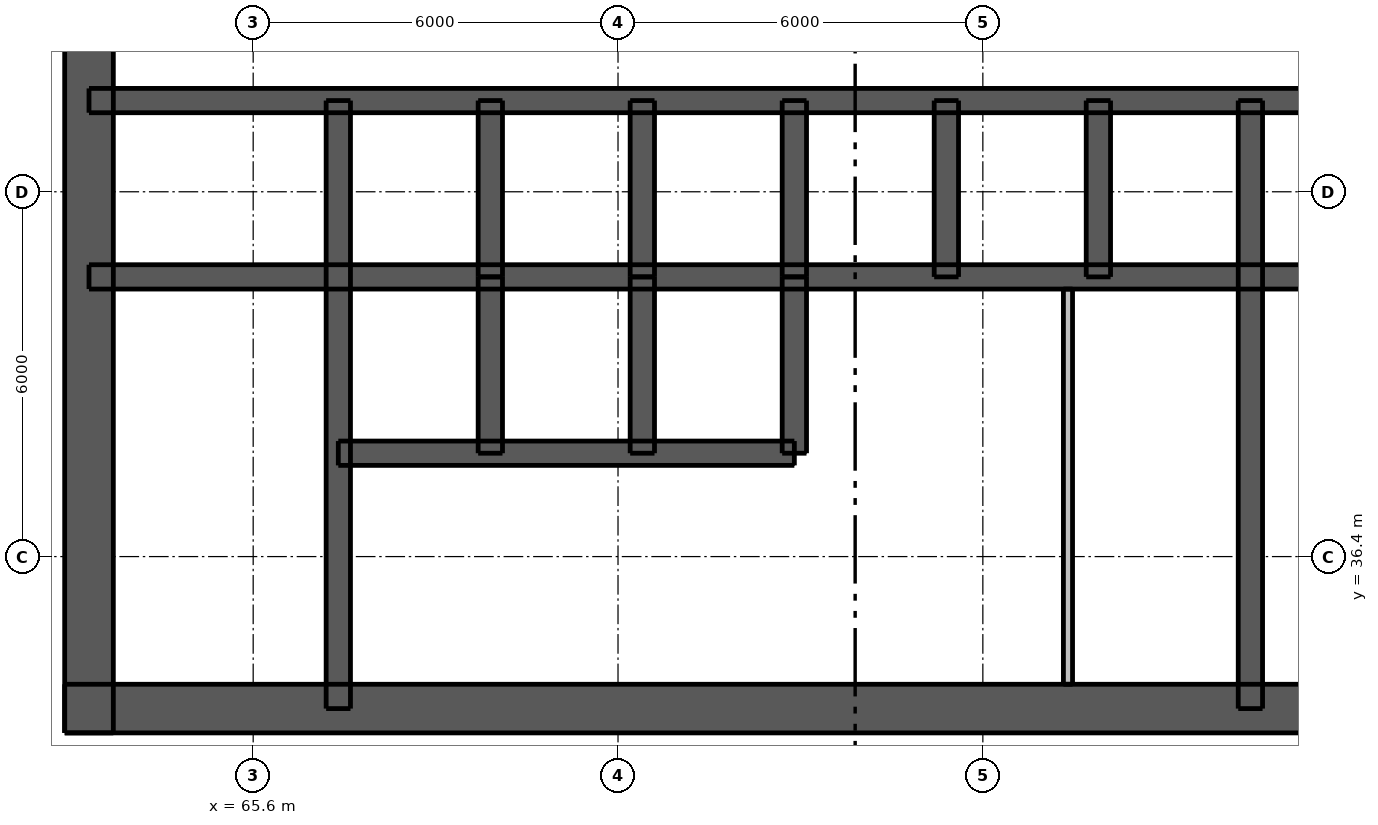
"""IFC4 building model, lengths in metres.
Left out: names, types, materials, properties, quantities, classifications, styles, units other than length and angle.
Written with IfcOpenShell. Run it as: python <this file> out.ifc"""

import sys

from ifc_helpers import new_model, si_unit, direction, frame, frame_2d, origin, place, context, subcontext, project, spatial, rectangle, extrude, element, fill, save


model = new_model("IFC4")
c1 = context("Model", 3, precision=1e-05, world=origin(), true_north=direction((0.0, 1.0)))
c2 = subcontext(c1, "Body", "Model", "MODEL_VIEW")
j1 = project(units=[si_unit("LENGTHUNIT", "METRE"), si_unit("PLANEANGLEUNIT", "RADIAN")], contexts=[c1])
p1 = place(None, origin())
s1 = spatial("IfcSite", under=j1, at=p1, CompositionType="ELEMENT")
p2 = place(p1, origin())
s2 = spatial("IfcBuilding", under=s1, at=p2, CompositionType="ELEMENT")
p3 = place(p2, frame((0.0, 0.0, 118.3)))
s3 = spatial("IfcBuildingStorey", under=s2, at=p3, CompositionType="ELEMENT", Elevation=118.3)
p4 = place(p3, frame((62.5, 33.9, 0.0), z_axis=(0.0, 0.0, 1.0), x_axis=(1.0, 0.0, 0.0)))
e1 = element("IfcWall", 1, at=p4, inside=s3, PredefinedType="SHEAR", context=c2, shape_type="SweptSolid", body=[
    extrude(rectangle(XDim=24.0, YDim=0.8, at=frame_2d((12.0, 0.0))), origin(), (0.0, 0.0, 1.0), 3.05),
])
p5 = place(p4, frame((2.0, 0.0, 0.0)))
e2 = element("IfcOpeningElement", 2, at=p5, cuts=e1, PredefinedType="OPENING", context=c2, shape_type="SweptSolid", body=[
    extrude(rectangle(XDim=1.1, YDim=2.1, at=frame_2d((0.55, 1.05))), frame((0.0, 0.41, 0.0), z_axis=(0.0, -1.0, 0.0), x_axis=(1.0, 0.0, 0.0)), (0.0, 0.0, 1.0), 0.82),
])
p6 = place(p4, frame((20.9, 0.0, 0.0)))
e3 = element("IfcOpeningElement", 3, at=p6, cuts=e1, PredefinedType="OPENING", context=c2, shape_type="SweptSolid", body=[
    extrude(rectangle(XDim=1.1, YDim=2.1, at=frame_2d((0.55, 1.05))), frame((0.0, 0.41, 0.0), z_axis=(0.0, -1.0, 0.0), x_axis=(1.0, 0.0, 0.0)), (0.0, 0.0, 1.0), 0.82),
])
p7 = place(p4, frame((8.0, 0.0, 0.0)))
e4 = element("IfcOpeningElement", 4, at=p7, cuts=e1, PredefinedType="OPENING", context=c2, shape_type="SweptSolid", body=[
    extrude(rectangle(XDim=1.1, YDim=2.1, at=frame_2d((0.55, 1.05))), frame((0.0, 0.41, 0.0), z_axis=(0.0, -1.0, 0.0), x_axis=(1.0, 0.0, 0.0)), (0.0, 0.0, 1.0), 0.82),
])
p8 = place(p4, frame((17.488, 0.0, 0.0)))
e5 = element("IfcOpeningElement", 5, at=p8, cuts=e1, PredefinedType="OPENING", context=c2, shape_type="SweptSolid", body=[
    extrude(rectangle(XDim=0.9, YDim=2.1, at=frame_2d((0.45, 1.05))), frame((0.0, 0.41, 0.0), z_axis=(0.0, -1.0, 0.0), x_axis=(1.0, 0.0, 0.0)), (0.0, 0.0, 1.0), 0.82),
])
p9 = place(p3, frame((62.9, 33.5, 0.0), z_axis=(0.0, 0.0, 1.0), x_axis=(0.0, 1.0, 0.0)))
e6 = element("IfcWall", 6, at=p9, inside=s3, PredefinedType="SHEAR", context=c2, shape_type="SweptSolid", body=[
    extrude(rectangle(XDim=24.0, YDim=0.8, at=frame_2d((12.0, 0.0))), origin(), (0.0, 0.0, 1.0), 3.05),
])
p10 = place(p9, frame((11.2, 0.0, 0.0)))
e7 = element("IfcOpeningElement", 7, at=p10, cuts=e6, PredefinedType="OPENING", context=c2, shape_type="SweptSolid", body=[
    extrude(rectangle(XDim=1.6, YDim=2.1, at=frame_2d((0.8, 1.05))), frame((0.0, 0.41, 0.0), z_axis=(0.0, -1.0, 0.0), x_axis=(1.0, 0.0, 0.0)), (0.0, 0.0, 1.0), 0.82),
])
p11 = place(p3, frame((62.9, 41.0, 0.0), z_axis=(0.0, 0.0, 1.0), x_axis=(1.0, 0.0, 0.0)))
e8 = element("IfcWall", 8, at=p11, inside=s3, PredefinedType="SHEAR", context=c2, shape_type="SweptSolid", body=[
    extrude(rectangle(XDim=23.2, YDim=0.4, at=frame_2d((11.6, 0.0))), origin(), (0.0, 0.0, 1.0), 3.05),
])
p12 = place(p3, frame((62.9, 43.9, 0.0), z_axis=(0.0, 0.0, 1.0), x_axis=(1.0, 0.0, 0.0)))
e9 = element("IfcWall", 9, at=p12, inside=s3, PredefinedType="SHEAR", context=c2, shape_type="SweptSolid", body=[
    extrude(rectangle(XDim=23.2, YDim=0.4, at=frame_2d((11.6, 0.0))), origin(), (0.0, 0.0, 1.0), 3.05),
])
p13 = place(p12, frame((1.7, 0.0, 0.0)))
e10 = element("IfcOpeningElement", 10, at=p13, cuts=e9, PredefinedType="OPENING", context=c2, shape_type="SweptSolid", body=[
    extrude(rectangle(XDim=0.9, YDim=2.1, at=frame_2d((0.45, 1.05))), frame((0.0, 0.21, 0.0), z_axis=(0.0, -1.0, 0.0), x_axis=(1.0, 0.0, 0.0)), (0.0, 0.0, 1.0), 0.42),
])
p14 = place(p12, frame((20.6, 0.0, 0.0)))
e11 = element("IfcOpeningElement", 11, at=p14, cuts=e9, PredefinedType="OPENING", context=c2, shape_type="SweptSolid", body=[
    extrude(rectangle(XDim=0.9, YDim=2.1, at=frame_2d((0.45, 1.05))), frame((0.0, 0.21, 0.0), z_axis=(0.0, -1.0, 0.0), x_axis=(1.0, 0.0, 0.0)), (0.0, 0.0, 1.0), 0.42),
])
p15 = place(p12, frame((4.8, 0.0, 0.0)))
e12 = element("IfcOpeningElement", 12, at=p15, cuts=e9, PredefinedType="OPENING", context=c2, shape_type="SweptSolid", body=[
    extrude(rectangle(XDim=1.1, YDim=2.1, at=frame_2d((0.55, 1.05))), frame((0.0, 0.21, 0.0), z_axis=(0.0, -1.0, 0.0), x_axis=(1.0, 0.0, 0.0)), (0.0, 0.0, 1.0), 0.42),
])
p16 = place(p12, frame((7.3, 0.0, 0.0)))
e13 = element("IfcOpeningElement", 13, at=p16, cuts=e9, PredefinedType="OPENING", context=c2, shape_type="SweptSolid", body=[
    extrude(rectangle(XDim=1.1, YDim=2.1, at=frame_2d((0.55, 1.05))), frame((0.0, 0.21, 0.0), z_axis=(0.0, -1.0, 0.0), x_axis=(1.0, 0.0, 0.0)), (0.0, 0.0, 1.0), 0.42),
])
p17 = place(p12, frame((9.8, 0.0, 0.0)))
e14 = element("IfcOpeningElement", 14, at=p17, cuts=e9, PredefinedType="OPENING", context=c2, shape_type="SweptSolid", body=[
    extrude(rectangle(XDim=1.1, YDim=2.1, at=frame_2d((0.55, 1.05))), frame((0.0, 0.21, 0.0), z_axis=(0.0, -1.0, 0.0), x_axis=(1.0, 0.0, 0.0)), (0.0, 0.0, 1.0), 0.42),
])
p18 = place(p12, frame((12.3, 0.0, 0.0)))
e15 = element("IfcOpeningElement", 15, at=p18, cuts=e9, PredefinedType="OPENING", context=c2, shape_type="SweptSolid", body=[
    extrude(rectangle(XDim=1.1, YDim=2.1, at=frame_2d((0.55, 1.05))), frame((0.0, 0.21, 0.0), z_axis=(0.0, -1.0, 0.0), x_axis=(1.0, 0.0, 0.0)), (0.0, 0.0, 1.0), 0.42),
])
p19 = place(p12, frame((14.8, 0.0, 0.0)))
e16 = element("IfcOpeningElement", 16, at=p19, cuts=e9, PredefinedType="OPENING", context=c2, shape_type="SweptSolid", body=[
    extrude(rectangle(XDim=1.1, YDim=2.1, at=frame_2d((0.55, 1.05))), frame((0.0, 0.21, 0.0), z_axis=(0.0, -1.0, 0.0), x_axis=(1.0, 0.0, 0.0)), (0.0, 0.0, 1.0), 0.42),
])
p20 = place(p12, frame((17.3, 0.0, 0.0)))
e17 = element("IfcOpeningElement", 17, at=p20, cuts=e9, PredefinedType="OPENING", context=c2, shape_type="SweptSolid", body=[
    extrude(rectangle(XDim=1.1, YDim=2.1, at=frame_2d((0.55, 1.05))), frame((0.0, 0.21, 0.0), z_axis=(0.0, -1.0, 0.0), x_axis=(1.0, 0.0, 0.0)), (0.0, 0.0, 1.0), 0.42),
])
p21 = place(p3, frame((67.0, 33.9, 0.0), z_axis=(0.0, 0.0, 1.0), x_axis=(0.0, 1.0, 0.0)))
e18 = element("IfcWall", 18, at=p21, inside=s3, PredefinedType="SHEAR", context=c2, shape_type="SweptSolid", body=[
    extrude(rectangle(XDim=10.0, YDim=0.4, at=frame_2d((5.0, 0.0))), origin(), (0.0, 0.0, 1.0), 3.05),
])
p22 = place(p21, frame((0.6, 0.0, 0.0)))
e19 = element("IfcOpeningElement", 19, at=p22, cuts=e18, PredefinedType="OPENING", context=c2, shape_type="SweptSolid", body=[
    extrude(rectangle(XDim=1.1, YDim=2.1, at=frame_2d((0.55, 1.05))), frame((0.0, 0.21, 0.0), z_axis=(0.0, -1.0, 0.0), x_axis=(1.0, 0.0, 0.0)), (0.0, 0.0, 1.0), 0.42),
])
p23 = place(p3, frame((82.0, 33.9, 0.0), z_axis=(0.0, 0.0, 1.0), x_axis=(0.0, 1.0, 0.0)))
e20 = element("IfcWall", 20, at=p23, inside=s3, PredefinedType="SHEAR", context=c2, shape_type="SweptSolid", body=[
    extrude(rectangle(XDim=10.0, YDim=0.4, at=frame_2d((5.0, 0.0))), origin(), (0.0, 0.0, 1.0), 3.05),
])
for number, where, z_axis, x_axis in (
    (21, (69.5, 41.0, 0.0), (0.0, 0.0, 1.0), (0.0, 1.0, 0.0)),
    (22, (72.0, 41.0, 0.0), (0.0, 0.0, 1.0), (0.0, 1.0, 0.0)),
    (23, (74.5, 41.0, 0.0), (0.0, 0.0, 1.0), (0.0, 1.0, 0.0)),
    (24, (77.0, 41.0, 0.0), (0.0, 0.0, 1.0), (0.0, 1.0, 0.0)),
    (25, (79.5, 41.0, 0.0), (0.0, 0.0, 1.0), (0.0, 1.0, 0.0)),
):
    element("IfcWall", number, at=place(p3, frame(where, z_axis=z_axis, x_axis=x_axis)), inside=s3, PredefinedType="SHEAR", context=c2, shape_type="SweptSolid", body=[
        extrude(rectangle(XDim=2.9, YDim=0.4, at=frame_2d((1.45, 0.0))), origin(), (0.0, 0.0, 1.0), 3.05),
    ])
p24 = place(p3, frame((67.0, 38.1, 0.0), z_axis=(0.0, 0.0, 1.0), x_axis=(1.0, 0.0, 0.0)))
e26 = element("IfcWall", 26, at=p24, inside=s3, PredefinedType="SHEAR", context=c2, shape_type="SweptSolid", body=[
    extrude(rectangle(XDim=7.5, YDim=0.4, at=frame_2d((3.75, 0.0))), origin(), (0.0, 0.0, 1.0), 3.05),
])
p25 = place(p24, frame((0.7, 0.0, 0.0)))
e27 = element("IfcOpeningElement", 27, at=p25, cuts=e26, PredefinedType="OPENING", context=c2, shape_type="SweptSolid", body=[
    extrude(rectangle(XDim=1.1, YDim=2.1, at=frame_2d((0.55, 1.05))), frame((0.0, 0.21, 0.0), z_axis=(0.0, -1.0, 0.0), x_axis=(1.0, 0.0, 0.0)), (0.0, 0.0, 1.0), 0.42),
])
p26 = place(p24, frame((3.2, 0.0, 0.0)))
e28 = element("IfcOpeningElement", 28, at=p26, cuts=e26, PredefinedType="OPENING", context=c2, shape_type="SweptSolid", body=[
    extrude(rectangle(XDim=1.1, YDim=2.1, at=frame_2d((0.55, 1.05))), frame((0.0, 0.21, 0.0), z_axis=(0.0, -1.0, 0.0), x_axis=(1.0, 0.0, 0.0)), (0.0, 0.0, 1.0), 0.42),
])
p27 = place(p24, frame((5.65, 0.0, 0.0)))
e29 = element("IfcOpeningElement", 29, at=p27, cuts=e26, PredefinedType="OPENING", context=c2, shape_type="SweptSolid", body=[
    extrude(rectangle(XDim=1.2, YDim=2.1, at=frame_2d((0.6, 1.05))), frame((0.0, 0.21, 0.0), z_axis=(0.0, -1.0, 0.0), x_axis=(1.0, 0.0, 0.0)), (0.0, 0.0, 1.0), 0.42),
])
for number, where, z_axis, x_axis in (
    (30, (69.5, 38.1, 0.0), (0.0, 0.0, 1.0), (0.0, 1.0, 0.0)),
    (31, (72.0, 38.1, 0.0), (0.0, 0.0, 1.0), (0.0, 1.0, 0.0)),
    (32, (74.5, 38.1, 0.0), (0.0, 0.0, 1.0), (0.0, 1.0, 0.0)),
):
    element("IfcWall", number, at=place(p3, frame(where, z_axis=z_axis, x_axis=x_axis)), inside=s3, PredefinedType="SHEAR", context=c2, shape_type="SweptSolid", body=[
        extrude(rectangle(XDim=2.9, YDim=0.4, at=frame_2d((1.45, 0.0))), origin(), (0.0, 0.0, 1.0), 3.05),
    ])
p28 = place(p3, frame((79.0, 34.3, 0.0), z_axis=(0.0, 0.0, 1.0), x_axis=(0.0, 1.0, 0.0)))
e33 = element("IfcWall", 33, at=p28, inside=s3, PredefinedType="PLUMBINGWALL", context=c2, shape_type="SweptSolid", body=[
    extrude(rectangle(XDim=6.5, YDim=0.15, at=frame_2d((3.25, 0.0))), origin(), (0.0, 0.0, 1.0), 3.05),
])
p29 = place(p5, origin())
e34 = element("IfcDoor", 34, at=p29, inside=s3, OperationType="SINGLE_SWING_LEFT", PredefinedType="DOOR", context=c2, shape_type="SweptSolid", body=[
    extrude(rectangle(XDim=1.1, YDim=2.1, at=frame_2d((0.55, 1.05))), frame((0.0, 0.388, 0.0), z_axis=(0.0, -1.0, 0.0), x_axis=(1.0, 0.0, 0.0)), (0.0, 0.0, 1.0), 0.05),
])
fill(e2, e34)
p30 = place(p7, origin())
e35 = element("IfcDoor", 35, at=p30, inside=s3, OperationType="SINGLE_SWING_LEFT", PredefinedType="DOOR", context=c2, shape_type="SweptSolid", body=[
    extrude(rectangle(XDim=1.1, YDim=2.1, at=frame_2d((0.55, 1.05))), frame((0.0, 0.388, 0.0), z_axis=(0.0, -1.0, 0.0), x_axis=(1.0, 0.0, 0.0)), (0.0, 0.0, 1.0), 0.05),
])
fill(e4, e35)
p31 = place(p22, origin())
e36 = element("IfcDoor", 36, at=p31, inside=s3, OperationType="SINGLE_SWING_RIGHT", PredefinedType="DOOR", context=c2, shape_type="SweptSolid", body=[
    extrude(rectangle(XDim=1.1, YDim=2.1, at=frame_2d((0.55, 1.05))), frame((0.0, -0.138, 0.0), z_axis=(0.0, -1.0, 0.0), x_axis=(1.0, 0.0, 0.0)), (0.0, 0.0, 1.0), 0.05),
])
fill(e19, e36)
p32 = place(p8, origin())
e37 = element("IfcDoor", 37, at=p32, inside=s3, OperationType="SINGLE_SWING_LEFT", PredefinedType="DOOR", context=c2, shape_type="SweptSolid", body=[
    extrude(rectangle(XDim=0.9, YDim=2.1, at=frame_2d((0.45, 1.05))), frame((0.0, 0.388, 0.0), z_axis=(0.0, -1.0, 0.0), x_axis=(1.0, 0.0, 0.0)), (0.0, 0.0, 1.0), 0.05),
])
fill(e5, e37)
p33 = place(p13, origin())
e38 = element("IfcDoor", 38, at=p33, inside=s3, OperationType="SINGLE_SWING_LEFT", PredefinedType="DOOR", context=c2, shape_type="SweptSolid", body=[
    extrude(rectangle(XDim=0.9, YDim=2.1, at=frame_2d((0.45, 1.05))), frame((0.0, -0.138, 0.0), z_axis=(0.0, -1.0, 0.0), x_axis=(1.0, 0.0, 0.0)), (0.0, 0.0, 1.0), 0.05),
])
fill(e10, e38)
p34 = place(p15, origin())
e39 = element("IfcDoor", 39, at=p34, inside=s3, OperationType="DOUBLE_DOOR_SLIDING", PredefinedType="DOOR", context=c2, shape_type="SweptSolid", body=[
    extrude(rectangle(XDim=1.1, YDim=2.1, at=frame_2d((0.55, 1.05))), frame((0.0, 0.025, 0.0), z_axis=(0.0, -1.0, 0.0), x_axis=(1.0, 0.0, 0.0)), (0.0, 0.0, 1.0), 0.05),
])
fill(e12, e39)
p35 = place(p16, origin())
e40 = element("IfcDoor", 40, at=p35, inside=s3, OperationType="DOUBLE_DOOR_SLIDING", PredefinedType="DOOR", context=c2, shape_type="SweptSolid", body=[
    extrude(rectangle(XDim=1.1, YDim=2.1, at=frame_2d((0.55, 1.05))), frame((0.0, 0.025, 0.0), z_axis=(0.0, -1.0, 0.0), x_axis=(1.0, 0.0, 0.0)), (0.0, 0.0, 1.0), 0.05),
])
fill(e13, e40)
p36 = place(p17, origin())
e41 = element("IfcDoor", 41, at=p36, inside=s3, OperationType="DOUBLE_DOOR_SLIDING", PredefinedType="DOOR", context=c2, shape_type="SweptSolid", body=[
    extrude(rectangle(XDim=1.1, YDim=2.1, at=frame_2d((0.55, 1.05))), frame((0.0, 0.025, 0.0), z_axis=(0.0, -1.0, 0.0), x_axis=(1.0, 0.0, 0.0)), (0.0, 0.0, 1.0), 0.05),
])
fill(e14, e41)
p37 = place(p18, origin())
e42 = element("IfcDoor", 42, at=p37, inside=s3, OperationType="DOUBLE_DOOR_SLIDING", PredefinedType="DOOR", context=c2, shape_type="SweptSolid", body=[
    extrude(rectangle(XDim=1.1, YDim=2.1, at=frame_2d((0.55, 1.05))), frame((0.0, 0.025, 0.0), z_axis=(0.0, -1.0, 0.0), x_axis=(1.0, 0.0, 0.0)), (0.0, 0.0, 1.0), 0.05),
])
fill(e15, e42)
p38 = place(p19, origin())
e43 = element("IfcDoor", 43, at=p38, inside=s3, OperationType="DOUBLE_DOOR_SLIDING", PredefinedType="DOOR", context=c2, shape_type="SweptSolid", body=[
    extrude(rectangle(XDim=1.1, YDim=2.1, at=frame_2d((0.55, 1.05))), frame((0.0, 0.025, 0.0), z_axis=(0.0, -1.0, 0.0), x_axis=(1.0, 0.0, 0.0)), (0.0, 0.0, 1.0), 0.05),
])
fill(e16, e43)
p39 = place(p20, origin())
e44 = element("IfcDoor", 44, at=p39, inside=s3, OperationType="DOUBLE_DOOR_SLIDING", PredefinedType="DOOR", context=c2, shape_type="SweptSolid", body=[
    extrude(rectangle(XDim=1.1, YDim=2.1, at=frame_2d((0.55, 1.05))), frame((0.0, 0.025, 0.0), z_axis=(0.0, -1.0, 0.0), x_axis=(1.0, 0.0, 0.0)), (0.0, 0.0, 1.0), 0.05),
])
fill(e17, e44)
p40 = place(p25, origin())
e45 = element("IfcDoor", 45, at=p40, inside=s3, OperationType="DOUBLE_DOOR_SLIDING", PredefinedType="DOOR", context=c2, shape_type="SweptSolid", body=[
    extrude(rectangle(XDim=1.1, YDim=2.1, at=frame_2d((0.55, 1.05))), frame((0.0, 0.025, 0.0), z_axis=(0.0, -1.0, 0.0), x_axis=(1.0, 0.0, 0.0)), (0.0, 0.0, 1.0), 0.05),
])
fill(e27, e45)
p41 = place(p26, origin())
e46 = element("IfcDoor", 46, at=p41, inside=s3, OperationType="DOUBLE_DOOR_SLIDING", PredefinedType="DOOR", context=c2, shape_type="SweptSolid", body=[
    extrude(rectangle(XDim=1.1, YDim=2.1, at=frame_2d((0.55, 1.05))), frame((0.0, 0.025, 0.0), z_axis=(0.0, -1.0, 0.0), x_axis=(1.0, 0.0, 0.0)), (0.0, 0.0, 1.0), 0.05),
])
fill(e28, e46)
p42 = place(p27, origin())
e47 = element("IfcDoor", 47, at=p42, inside=s3, OperationType="DOUBLE_DOOR_SLIDING", PredefinedType="DOOR", context=c2, shape_type="SweptSolid", body=[
    extrude(rectangle(XDim=1.2, YDim=2.1, at=frame_2d((0.6, 1.05))), frame((0.0, 0.025, 0.0), z_axis=(0.0, -1.0, 0.0), x_axis=(1.0, 0.0, 0.0)), (0.0, 0.0, 1.0), 0.05),
])
fill(e29, e47)
save(model, sys.argv[1])
